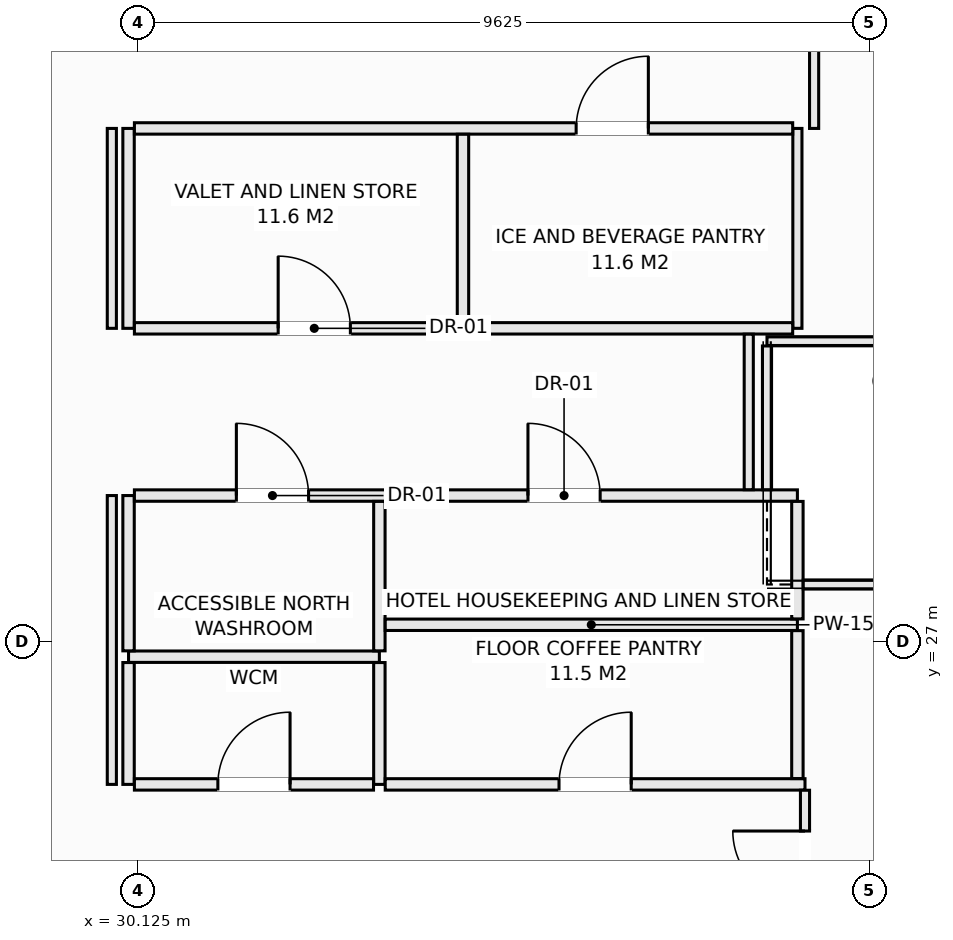
"""IFC4 building model, lengths in metres.
Left out: names, types, materials, properties, quantities, classifications, styles, units other than length and angle.
Written with IfcOpenShell. Run it as: python <this file> out.ifc"""

import sys

from ifc_helpers import new_model, si_unit, direction, frame, frame_2d, origin, place, context, subcontext, project, spatial, rectangle, extrude, element, fill, save


model = new_model("IFC4")
c1 = context("Model", 3, precision=1e-05, world=origin(), true_north=direction((0.0, 1.0)))
c2 = subcontext(c1, "Body", "Model", "MODEL_VIEW")
j1 = project(units=[si_unit("LENGTHUNIT", "METRE"), si_unit("PLANEANGLEUNIT", "RADIAN")], contexts=[c1])
p1 = place(None, origin())
s1 = spatial("IfcSite", under=j1, at=p1, CompositionType="ELEMENT")
p2 = place(p1, origin())
s2 = spatial("IfcBuilding", under=s1, at=p2, CompositionType="ELEMENT")
p3 = place(p2, frame((0.0, 0.0, 108.7)))
s3 = spatial("IfcBuildingStorey", under=s2, at=p3, CompositionType="ELEMENT", Elevation=108.7)
p4 = place(p3, frame((30.0, 26.8, 0.0), z_axis=(0.0, 0.0, 1.0), x_axis=(1.0, 0.0, 0.0)))
e1 = element("IfcWall", 1, at=p4, inside=s3, PredefinedType="PARTITIONING", context=c2, shape_type="SweptSolid", body=[
    extrude(rectangle(XDim=3.3, YDim=0.15, at=frame_2d((1.65, 0.0))), origin(), (0.0, 0.0, 1.0), 3.13),
])
p5 = place(p3, frame((30.0, 25.12, 0.0), z_axis=(0.0, 0.0, 1.0), x_axis=(0.0, 1.0, 0.0)))
e2 = element("IfcWall", 2, at=p5, inside=s3, PredefinedType="PARTITIONING", context=c2, shape_type="SweptSolid", body=[
    extrude(rectangle(XDim=1.603, YDim=0.15, at=frame_2d((0.801, 0.0))), origin(), (0.0, 0.0, 1.0), 3.13),
])
p6 = place(p3, frame((30.0, 26.877, 0.0), z_axis=(0.0, 0.0, 1.0), x_axis=(0.0, 1.0, 0.0)))
e3 = element("IfcWall", 3, at=p6, inside=s3, PredefinedType="PARTITIONING", context=c2, shape_type="SweptSolid", body=[
    extrude(rectangle(XDim=2.043, YDim=0.15, at=frame_2d((1.021, 0.0))), origin(), (0.0, 0.0, 1.0), 3.13),
])
p7 = place(p3, frame((30.0, 31.12, 0.0), z_axis=(0.0, 0.0, 1.0), x_axis=(0.0, 1.0, 0.0)))
e4 = element("IfcWall", 4, at=p7, inside=s3, PredefinedType="PARTITIONING", context=c2, shape_type="SweptSolid", body=[
    extrude(rectangle(XDim=2.63, YDim=0.15, at=frame_2d((1.315, 0.0))), origin(), (0.0, 0.0, 1.0), 3.13),
])
p8 = place(p3, frame((30.077, 28.92, 0.0), z_axis=(0.0, 0.0, 1.0), x_axis=(1.0, 0.0, 0.0)))
e5 = element("IfcWall", 5, at=p8, inside=s3, PredefinedType="PARTITIONING", context=c2, shape_type="SweptSolid", body=[
    extrude(rectangle(XDim=8.723, YDim=0.15, at=frame_2d((4.362, 0.0))), origin(), (0.0, 0.0, 1.0), 3.13),
])
p9 = place(p8, frame((1.342, 0.0, 0.0)))
e6 = element("IfcOpeningElement", 6, at=p9, cuts=e5, PredefinedType="OPENING", context=c2, shape_type="SweptSolid", body=[
    extrude(rectangle(XDim=0.95, YDim=2.1, at=frame_2d((0.475, 1.05))), frame((0.0, 0.085, 0.0), z_axis=(0.0, -1.0, 0.0), x_axis=(1.0, 0.0, 0.0)), (0.0, 0.0, 1.0), 0.17),
])
p10 = place(p8, frame((5.178, 0.0, 0.0)))
e7 = element("IfcOpeningElement", 7, at=p10, cuts=e5, PredefinedType="OPENING", context=c2, shape_type="SweptSolid", body=[
    extrude(rectangle(XDim=0.95, YDim=2.1, at=frame_2d((0.475, 1.05))), frame((0.0, 0.085, 0.0), z_axis=(0.0, -1.0, 0.0), x_axis=(1.0, 0.0, 0.0)), (0.0, 0.0, 1.0), 0.17),
])
p11 = place(p3, frame((33.3, 25.12, 0.0), z_axis=(0.0, 0.0, 1.0), x_axis=(0.0, 1.0, 0.0)))
e8 = element("IfcWall", 8, at=p11, inside=s3, PredefinedType="PARTITIONING", context=c2, shape_type="SweptSolid", body=[
    extrude(rectangle(XDim=1.603, YDim=0.15, at=frame_2d((0.801, 0.0))), origin(), (0.0, 0.0, 1.0), 3.13),
])
p12 = place(p3, frame((33.3, 26.877, 0.0), z_axis=(0.0, 0.0, 1.0), x_axis=(0.0, 1.0, 0.0)))
e9 = element("IfcWall", 9, at=p12, inside=s3, PredefinedType="PARTITIONING", context=c2, shape_type="SweptSolid", body=[
    extrude(rectangle(XDim=1.966, YDim=0.15, at=frame_2d((0.983, 0.0))), origin(), (0.0, 0.0, 1.0), 3.13),
])
p13 = place(p3, frame((30.077, 25.12, 0.0), z_axis=(0.0, 0.0, 1.0), x_axis=(1.0, 0.0, 0.0)))
e10 = element("IfcWall", 10, at=p13, inside=s3, PredefinedType="PARTITIONING", context=c2, shape_type="SweptSolid", body=[
    extrude(rectangle(XDim=3.146, YDim=0.15, at=frame_2d((1.573, 0.0))), origin(), (0.0, 0.0, 1.0), 3.13),
])
p14 = place(p13, frame((1.098, 0.0, 0.0)))
e11 = element("IfcOpeningElement", 11, at=p14, cuts=e10, PredefinedType="OPENING", context=c2, shape_type="SweptSolid", body=[
    extrude(rectangle(XDim=0.95, YDim=2.1, at=frame_2d((0.475, 1.05))), frame((0.0, 0.085, 0.0), z_axis=(0.0, -1.0, 0.0), x_axis=(1.0, 0.0, 0.0)), (0.0, 0.0, 1.0), 0.17),
])
p15 = place(p3, frame((33.377, 25.12, 0.0), z_axis=(0.0, 0.0, 1.0), x_axis=(1.0, 0.0, 0.0)))
e12 = element("IfcWall", 12, at=p15, inside=s3, PredefinedType="PARTITIONING", context=c2, shape_type="SweptSolid", body=[
    extrude(rectangle(XDim=5.523, YDim=0.15, at=frame_2d((2.761, 0.0))), origin(), (0.0, 0.0, 1.0), 3.13),
])
p16 = place(p15, frame((2.287, 0.0, 0.0)))
e13 = element("IfcOpeningElement", 13, at=p16, cuts=e12, PredefinedType="OPENING", context=c2, shape_type="SweptSolid", body=[
    extrude(rectangle(XDim=0.95, YDim=2.1, at=frame_2d((0.475, 1.05))), frame((0.0, 0.085, 0.0), z_axis=(0.0, -1.0, 0.0), x_axis=(1.0, 0.0, 0.0)), (0.0, 0.0, 1.0), 0.17),
])
p17 = place(p3, frame((33.377, 27.22, 0.0), z_axis=(0.0, 0.0, 1.0), x_axis=(1.0, 0.0, 0.0)))
e14 = element("IfcWall", 14, at=p17, inside=s3, PredefinedType="PARTITIONING", context=c2, shape_type="SweptSolid", body=[
    extrude(rectangle(XDim=5.423, YDim=0.15, at=frame_2d((2.711, 0.0))), origin(), (0.0, 0.0, 1.0), 3.13),
])
p18 = place(p3, frame((38.8, 25.197, 0.0), z_axis=(0.0, 0.0, 1.0), x_axis=(0.0, 1.0, 0.0)))
e15 = element("IfcWall", 15, at=p18, inside=s3, PredefinedType="PARTITIONING", context=c2, shape_type="SweptSolid", body=[
    extrude(rectangle(XDim=1.946, YDim=0.15, at=frame_2d((0.973, 0.0))), origin(), (0.0, 0.0, 1.0), 3.13),
])
p19 = place(p3, frame((38.8, 27.297, 0.0), z_axis=(0.0, 0.0, 1.0), x_axis=(0.0, 1.0, 0.0)))
e16 = element("IfcWall", 16, at=p19, inside=s3, PredefinedType="PARTITIONING", context=c2, shape_type="SweptSolid", body=[
    extrude(rectangle(XDim=1.546, YDim=0.15, at=frame_2d((0.773, 0.0))), origin(), (0.0, 0.0, 1.0), 3.13),
])
p20 = place(p3, frame((38.8, 31.12, 0.0), z_axis=(0.0, 0.0, 1.0), x_axis=(0.0, 1.0, 0.0)))
e17 = element("IfcWall", 17, at=p20, inside=s3, PredefinedType="PARTITIONING", context=c2, shape_type="SweptSolid", body=[
    extrude(rectangle(XDim=2.63, YDim=0.12, at=frame_2d((1.315, 0.0))), origin(), (0.0, 0.0, 1.0), 3.13),
])
p21 = place(p3, frame((30.077, 31.12, 0.0), z_axis=(0.0, 0.0, 1.0), x_axis=(1.0, 0.0, 0.0)))
e18 = element("IfcWall", 18, at=p21, inside=s3, PredefinedType="PARTITIONING", context=c2, shape_type="SweptSolid", body=[
    extrude(rectangle(XDim=8.661, YDim=0.15, at=frame_2d((4.331, 0.0))), origin(), (0.0, 0.0, 1.0), 3.13),
])
p22 = place(p21, frame((1.892, 0.0, 0.0)))
e19 = element("IfcOpeningElement", 19, at=p22, cuts=e18, PredefinedType="OPENING", context=c2, shape_type="SweptSolid", body=[
    extrude(rectangle(XDim=0.95, YDim=2.1, at=frame_2d((0.475, 1.05))), frame((0.0, 0.085, 0.0), z_axis=(0.0, -1.0, 0.0), x_axis=(1.0, 0.0, 0.0)), (0.0, 0.0, 1.0), 0.17),
])
p23 = place(p3, frame((30.077, 33.75, 0.0), z_axis=(0.0, 0.0, 1.0), x_axis=(1.0, 0.0, 0.0)))
e20 = element("IfcWall", 20, at=p23, inside=s3, PredefinedType="PARTITIONING", context=c2, shape_type="SweptSolid", body=[
    extrude(rectangle(XDim=8.661, YDim=0.15, at=frame_2d((4.331, 0.0))), origin(), (0.0, 0.0, 1.0), 3.13),
])
p24 = place(p23, frame((5.812, 0.0, 0.0)))
e21 = element("IfcOpeningElement", 21, at=p24, cuts=e20, PredefinedType="OPENING", context=c2, shape_type="SweptSolid", body=[
    extrude(rectangle(XDim=0.95, YDim=2.1, at=frame_2d((0.475, 1.05))), frame((0.0, 0.085, 0.0), z_axis=(0.0, -1.0, 0.0), x_axis=(1.0, 0.0, 0.0)), (0.0, 0.0, 1.0), 0.17),
])
p25 = place(p3, frame((34.4, 31.197, 0.0), z_axis=(0.0, 0.0, 1.0), x_axis=(0.0, 1.0, 0.0)))
e22 = element("IfcWall", 22, at=p25, inside=s3, PredefinedType="PARTITIONING", context=c2, shape_type="SweptSolid", body=[
    extrude(rectangle(XDim=2.476, YDim=0.15, at=frame_2d((1.238, 0.0))), origin(), (0.0, 0.0, 1.0), 3.13),
])
p26 = place(p3, frame((39.02, 33.75, 0.0), z_axis=(0.0, 0.0, 1.0), x_axis=(0.0, 1.0, 0.0)))
e23 = element("IfcWall", 23, at=p26, inside=s3, PredefinedType="PARTITIONING", context=c2, shape_type="SweptSolid", body=[
    extrude(rectangle(XDim=2.0, YDim=0.12, at=frame_2d((1.0, 0.0))), origin(), (0.0, 0.0, 1.0), 3.13),
])
p27 = place(p3, frame((29.78, 25.12, 0.0), z_axis=(0.0, 0.0, 1.0), x_axis=(0.0, 1.0, 0.0)))
e24 = element("IfcWall", 24, at=p27, inside=s3, PredefinedType="PARTITIONING", context=c2, shape_type="SweptSolid", body=[
    extrude(rectangle(XDim=3.8, YDim=0.12, at=frame_2d((1.9, 0.0))), origin(), (0.0, 0.0, 1.0), 3.13),
])
p28 = place(p3, frame((29.78, 31.12, 0.0), z_axis=(0.0, 0.0, 1.0), x_axis=(0.0, 1.0, 0.0)))
e25 = element("IfcWall", 25, at=p28, inside=s3, PredefinedType="PARTITIONING", context=c2, shape_type="SweptSolid", body=[
    extrude(rectangle(XDim=2.63, YDim=0.12, at=frame_2d((1.315, 0.0))), origin(), (0.0, 0.0, 1.0), 3.13),
])
p29 = place(p3, frame((38.16, 28.997, 0.0), z_axis=(0.0, 0.0, 1.0), x_axis=(0.0, 1.0, 0.0)))
e26 = element("IfcWall", 26, at=p29, inside=s3, PredefinedType="PARTITIONING", context=c2, shape_type="SweptSolid", body=[
    extrude(rectangle(XDim=2.046, YDim=0.12, at=frame_2d((1.023, 0.0))), origin(), (0.0, 0.0, 1.0), 3.13),
])
p30 = place(p3, frame((38.9, 23.02, 0.0), z_axis=(0.0, 0.0, 1.0), x_axis=(0.0, 1.0, 0.0)))
e27 = element("IfcWall", 27, at=p30, inside=s3, PredefinedType="PARTITIONING", context=c2, shape_type="SweptSolid", body=[
    extrude(rectangle(XDim=2.023, YDim=0.12, at=frame_2d((1.011, 0.0))), origin(), (0.0, 0.0, 1.0), 3.13),
])
p31 = place(p30, frame((0.537, 0.0, 0.0)))
e28 = element("IfcOpeningElement", 28, at=p31, cuts=e27, PredefinedType="OPENING", context=c2, shape_type="SweptSolid", body=[
    extrude(rectangle(XDim=0.95, YDim=2.1, at=frame_2d((0.475, 1.05))), frame((0.0, 0.07, 0.0), z_axis=(0.0, -1.0, 0.0), x_axis=(1.0, 0.0, 0.0)), (0.0, 0.0, 1.0), 0.14),
])
p32 = place(p3, frame((39.02, 20.97, 0.0), z_axis=(0.0, 0.0, 1.0), x_axis=(0.933683590648, 0.358099082035, 0.0)))
e29 = element("IfcWall", 29, at=p32, inside=s3, PredefinedType="PARTITIONING", context=c2, shape_type="SweptSolid", body=[
    extrude(rectangle(XDim=9.855, YDim=0.12, at=frame_2d((4.927, 0.0))), origin(), (0.0, 0.0, 1.0), 2.812),
])
p33 = place(p3, frame((37.565, 40.488, 0.0), z_axis=(0.0, 0.0, 1.0), x_axis=(0.554585457046, -0.832126775698, 0.0)))
e30 = element("IfcWall", 30, at=p33, inside=s3, PredefinedType="PARTITIONING", context=c2, shape_type="SweptSolid", body=[
    extrude(rectangle(XDim=19.151, YDim=0.15, at=frame_2d((9.575, 0.0))), origin(), (0.0, 0.0, 1.0), 3.13),
])
p34 = place(p3, frame((38.877, 27.75, 0.0), z_axis=(0.0, 0.0, 1.0), x_axis=(1.0, 0.0, 0.0)))
e31 = element("IfcWall", 31, at=p34, inside=s3, PredefinedType="PARTITIONING", context=c2, shape_type="SweptSolid", body=[
    extrude(rectangle(XDim=4.923, YDim=0.12, at=frame_2d((2.461, 0.0))), origin(), (0.0, 0.0, 1.0), 3.13),
])
p35 = place(p3, frame((38.4, 30.95, 0.0), z_axis=(0.0, 0.0, 1.0), x_axis=(1.0, 0.0, 0.0)))
e32 = element("IfcWall", 32, at=p35, inside=s3, PredefinedType="PARTITIONING", context=c2, shape_type="SweptSolid", body=[
    extrude(rectangle(XDim=5.338, YDim=0.12, at=frame_2d((2.669, 0.0))), origin(), (0.0, 0.0, 1.0), 3.13),
])
p36 = place(p3, frame((38.4, 28.997, 0.0), z_axis=(0.0, 0.0, 1.0), x_axis=(0.0, 1.0, 0.0)))
e33 = element("IfcWall", 33, at=p36, inside=s3, PredefinedType="PARTITIONING", context=c2, shape_type="SweptSolid", body=[
    extrude(rectangle(XDim=1.891, YDim=0.12, at=frame_2d((0.945, 0.0))), origin(), (0.0, 0.0, 1.0), 3.13),
])
p37 = place(p9, origin())
e34 = element("IfcDoor", 34, at=p37, inside=s3, OperationType="SINGLE_SWING_LEFT", PredefinedType="DOOR", context=c2, shape_type="SweptSolid", body=[
    extrude(rectangle(XDim=0.95, YDim=2.1, at=frame_2d((0.475, 1.05))), frame((0.0, 0.025, 0.0), z_axis=(0.0, -1.0, 0.0), x_axis=(1.0, 0.0, 0.0)), (0.0, 0.0, 1.0), 0.05),
])
fill(e6, e34)
p38 = place(p14, origin())
e35 = element("IfcDoor", 35, at=p38, inside=s3, OperationType="SINGLE_SWING_RIGHT", PredefinedType="DOOR", context=c2, shape_type="SweptSolid", body=[
    extrude(rectangle(XDim=0.95, YDim=2.1, at=frame_2d((0.475, 1.05))), frame((0.0, 0.025, 0.0), z_axis=(0.0, -1.0, 0.0), x_axis=(1.0, 0.0, 0.0)), (0.0, 0.0, 1.0), 0.05),
])
fill(e11, e35)
p39 = place(p10, origin())
e36 = element("IfcDoor", 36, at=p39, inside=s3, OperationType="SINGLE_SWING_LEFT", PredefinedType="DOOR", context=c2, shape_type="SweptSolid", body=[
    extrude(rectangle(XDim=0.95, YDim=2.1, at=frame_2d((0.475, 1.05))), frame((0.0, 0.025, 0.0), z_axis=(0.0, -1.0, 0.0), x_axis=(1.0, 0.0, 0.0)), (0.0, 0.0, 1.0), 0.05),
])
fill(e7, e36)
p40 = place(p16, origin())
e37 = element("IfcDoor", 37, at=p40, inside=s3, OperationType="SINGLE_SWING_RIGHT", PredefinedType="DOOR", context=c2, shape_type="SweptSolid", body=[
    extrude(rectangle(XDim=0.95, YDim=2.1, at=frame_2d((0.475, 1.05))), frame((0.0, 0.025, 0.0), z_axis=(0.0, -1.0, 0.0), x_axis=(1.0, 0.0, 0.0)), (0.0, 0.0, 1.0), 0.05),
])
fill(e13, e37)
p41 = place(p22, origin())
e38 = element("IfcDoor", 38, at=p41, inside=s3, OperationType="SINGLE_SWING_LEFT", PredefinedType="DOOR", context=c2, shape_type="SweptSolid", body=[
    extrude(rectangle(XDim=0.95, YDim=2.1, at=frame_2d((0.475, 1.05))), frame((0.0, 0.025, 0.0), z_axis=(0.0, -1.0, 0.0), x_axis=(1.0, 0.0, 0.0)), (0.0, 0.0, 1.0), 0.05),
])
fill(e19, e38)
p42 = place(p24, origin())
e39 = element("IfcDoor", 39, at=p42, inside=s3, OperationType="SINGLE_SWING_RIGHT", PredefinedType="DOOR", context=c2, shape_type="SweptSolid", body=[
    extrude(rectangle(XDim=0.95, YDim=2.1, at=frame_2d((0.475, 1.05))), frame((0.0, 0.025, 0.0), z_axis=(0.0, -1.0, 0.0), x_axis=(1.0, 0.0, 0.0)), (0.0, 0.0, 1.0), 0.05),
])
fill(e21, e39)
p43 = place(p31, origin())
e40 = element("IfcDoor", 40, at=p43, inside=s3, OperationType="SINGLE_SWING_RIGHT", PredefinedType="DOOR", context=c2, shape_type="SweptSolid", body=[
    extrude(rectangle(XDim=0.95, YDim=2.1, at=frame_2d((0.475, 1.05))), frame((0.0, 0.025, 0.0), z_axis=(0.0, -1.0, 0.0), x_axis=(1.0, 0.0, 0.0)), (0.0, 0.0, 1.0), 0.05),
])
fill(e28, e40)
save(model, sys.argv[1])
